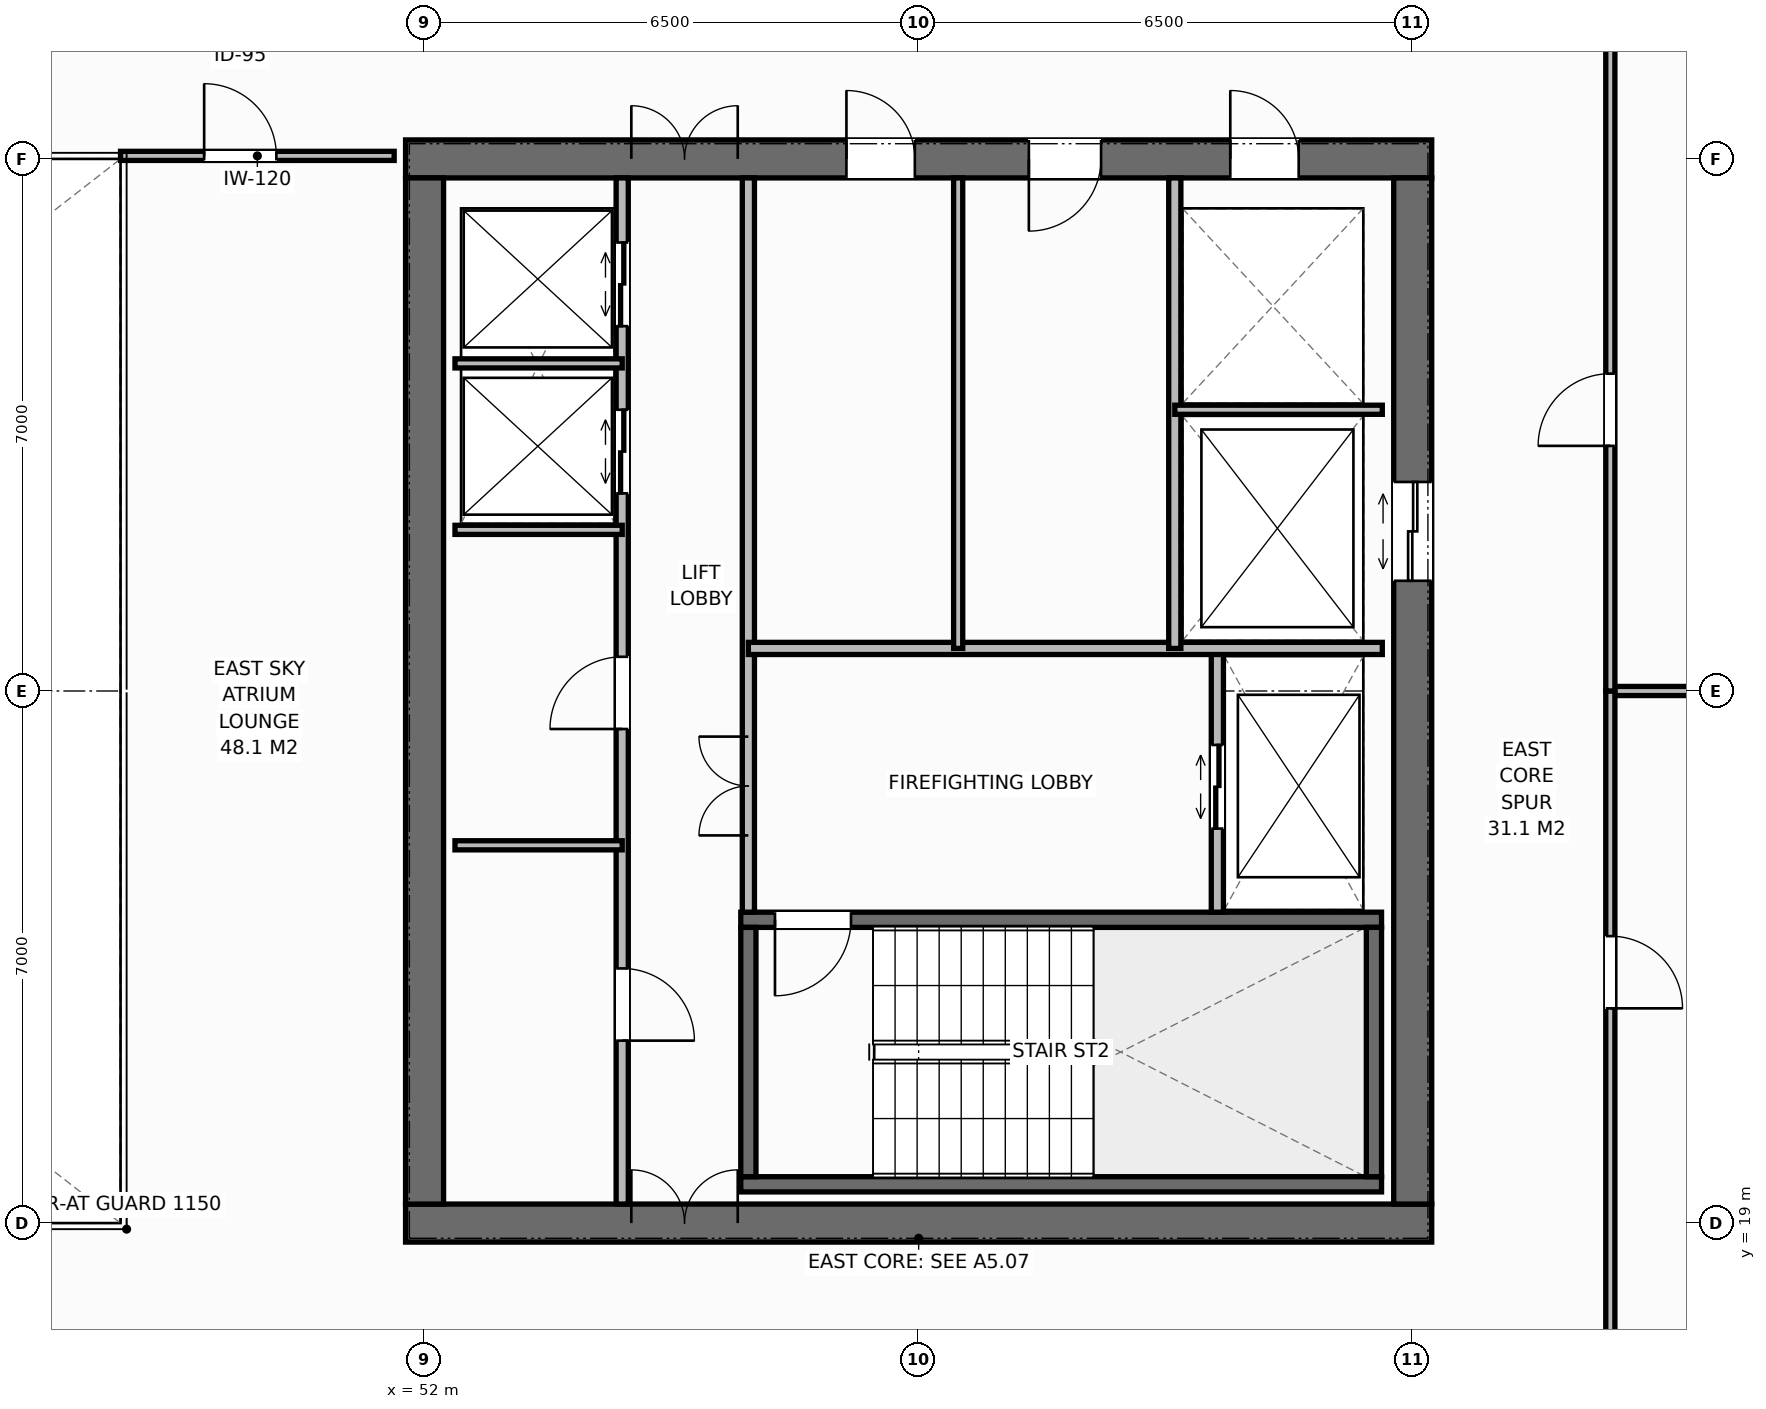
"""IFC4 building model, lengths in metres.
Left out: names, types, materials, properties, quantities, classifications, styles, units other than length and angle.
Written with IfcOpenShell. Run it as: python <this file> out.ifc"""

import sys

from ifc_helpers import new_model, si_unit, direction, frame, frame_2d, origin, place, context, subcontext, project, spatial, rectangle, extrude, element, fill, save


model = new_model("IFC4")
c1 = context("Model", 3, precision=1e-05, world=origin(), true_north=direction((0.0, 1.0)))
c2 = subcontext(c1, "Body", "Model", "MODEL_VIEW")
j1 = project(units=[si_unit("LENGTHUNIT", "METRE"), si_unit("PLANEANGLEUNIT", "RADIAN")], contexts=[c1])
p1 = place(None, origin())
s1 = spatial("IfcSite", under=j1, at=p1, CompositionType="ELEMENT")
p2 = place(p1, origin())
s2 = spatial("IfcBuilding", under=s1, at=p2, CompositionType="ELEMENT")
p3 = place(p2, frame((0.0, 0.0, 206.2)))
s3 = spatial("IfcBuildingStorey", under=s2, at=p3, CompositionType="ELEMENT", Elevation=206.2)
p4 = place(p3, frame((51.75, 19.0, 0.0), z_axis=(0.0, 0.0, 1.0), x_axis=(1.0, 0.0, 0.0)))
e1 = element("IfcWall", 1, at=p4, inside=s3, PredefinedType="SHEAR", context=c2, shape_type="SweptSolid", body=[
    extrude(rectangle(XDim=13.5, YDim=0.5, at=frame_2d((6.75, 0.0))), origin(), (0.0, 0.0, 1.0), 3.8),
])
p5 = place(p4, frame((2.97, 0.0, 0.0)))
e2 = element("IfcOpeningElement", 2, at=p5, cuts=e1, PredefinedType="OPENING", context=c2, shape_type="SweptSolid", body=[
    extrude(rectangle(XDim=1.4, YDim=2.2, at=frame_2d((0.7, 1.1))), frame((0.0, 0.26, 0.0), z_axis=(0.0, -1.0, 0.0), x_axis=(1.0, 0.0, 0.0)), (0.0, 0.0, 1.0), 0.52),
])
p6 = place(p3, frame((51.75, 33.0, 0.0), z_axis=(0.0, 0.0, 1.0), x_axis=(1.0, 0.0, 0.0)))
e3 = element("IfcWall", 3, at=p6, inside=s3, PredefinedType="SHEAR", context=c2, shape_type="SweptSolid", body=[
    extrude(rectangle(XDim=13.5, YDim=0.5, at=frame_2d((6.75, 0.0))), origin(), (0.0, 0.0, 1.0), 3.8),
])
p7 = place(p6, frame((2.97, 0.0, 0.0)))
e4 = element("IfcOpeningElement", 4, at=p7, cuts=e3, PredefinedType="OPENING", context=c2, shape_type="SweptSolid", body=[
    extrude(rectangle(XDim=1.4, YDim=2.2, at=frame_2d((0.7, 1.1))), frame((0.0, 0.26, 0.0), z_axis=(0.0, -1.0, 0.0), x_axis=(1.0, 0.0, 0.0)), (0.0, 0.0, 1.0), 0.52),
])
p8 = place(p6, frame((10.85, 0.0, 0.0)))
e5 = element("IfcOpeningElement", 5, at=p8, cuts=e3, PredefinedType="OPENING", context=c2, shape_type="SweptSolid", body=[
    extrude(rectangle(XDim=0.9, YDim=2.15, at=frame_2d((0.45, 1.075))), frame((0.0, 0.26, 0.0), z_axis=(0.0, -1.0, 0.0), x_axis=(1.0, 0.0, 0.0)), (0.0, 0.0, 1.0), 0.52),
])
p9 = place(p6, frame((5.8, 0.0, 0.0)))
e6 = element("IfcOpeningElement", 6, at=p9, cuts=e3, PredefinedType="OPENING", context=c2, shape_type="SweptSolid", body=[
    extrude(rectangle(XDim=0.9, YDim=2.15, at=frame_2d((0.45, 1.075))), frame((0.0, 0.26, 0.0), z_axis=(0.0, -1.0, 0.0), x_axis=(1.0, 0.0, 0.0)), (0.0, 0.0, 1.0), 0.52),
])
p10 = place(p6, frame((8.2, 0.0, 0.0)))
e7 = element("IfcOpeningElement", 7, at=p10, cuts=e3, PredefinedType="OPENING", context=c2, shape_type="SweptSolid", body=[
    extrude(rectangle(XDim=0.95, YDim=2.15, at=frame_2d((0.475, 1.075))), frame((0.0, 0.26, 0.0), z_axis=(0.0, -1.0, 0.0), x_axis=(1.0, 0.0, 0.0)), (0.0, 0.0, 1.0), 0.52),
])
p11 = place(p3, frame((52.0, 19.25, 0.0), z_axis=(0.0, 0.0, 1.0), x_axis=(0.0, 1.0, 0.0)))
e8 = element("IfcWall", 8, at=p11, inside=s3, PredefinedType="SHEAR", context=c2, shape_type="SweptSolid", body=[
    extrude(rectangle(XDim=13.5, YDim=0.5, at=frame_2d((6.75, 0.0))), origin(), (0.0, 0.0, 1.0), 3.8),
])
p12 = place(p3, frame((65.0, 19.25, 0.0), z_axis=(0.0, 0.0, 1.0), x_axis=(0.0, 1.0, 0.0)))
e9 = element("IfcWall", 9, at=p12, inside=s3, PredefinedType="SHEAR", context=c2, shape_type="SweptSolid", body=[
    extrude(rectangle(XDim=13.5, YDim=0.5, at=frame_2d((6.75, 0.0))), origin(), (0.0, 0.0, 1.0), 3.8),
])
p13 = place(p12, frame((8.2, 0.0, 0.0)))
e10 = element("IfcOpeningElement", 10, at=p13, cuts=e9, PredefinedType="OPENING", context=c2, shape_type="SweptSolid", body=[
    extrude(rectangle(XDim=1.3, YDim=2.2, at=frame_2d((0.65, 1.1))), frame((0.0, 0.26, 0.0), z_axis=(0.0, -1.0, 0.0), x_axis=(1.0, 0.0, 0.0)), (0.0, 0.0, 1.0), 0.52),
])
p14 = place(p3, frame((56.16, 19.51, 0.0), z_axis=(0.0, 0.0, 1.0), x_axis=(1.0, 0.0, 0.0)))
e11 = element("IfcWall", 11, at=p14, inside=s3, PredefinedType="SHEAR", context=c2, shape_type="SweptSolid", body=[
    extrude(rectangle(XDim=8.43, YDim=0.2, at=frame_2d((4.215, 0.0))), origin(), (0.0, 0.0, 1.0), 3.8),
])
p15 = place(p3, frame((56.16, 22.99, 0.0), z_axis=(0.0, 0.0, 1.0), x_axis=(1.0, 0.0, 0.0)))
e12 = element("IfcWall", 12, at=p15, inside=s3, PredefinedType="SHEAR", context=c2, shape_type="SweptSolid", body=[
    extrude(rectangle(XDim=8.43, YDim=0.2, at=frame_2d((4.215, 0.0))), origin(), (0.0, 0.0, 1.0), 3.8),
])
p16 = place(p15, frame((0.45, 0.0, 0.0)))
e13 = element("IfcOpeningElement", 13, at=p16, cuts=e12, PredefinedType="OPENING", context=c2, shape_type="SweptSolid", body=[
    extrude(rectangle(XDim=1.0, YDim=2.15, at=frame_2d((0.5, 1.075))), frame((0.0, 0.11, 0.0), z_axis=(0.0, -1.0, 0.0), x_axis=(1.0, 0.0, 0.0)), (0.0, 0.0, 1.0), 0.22),
])
for number, where, z_axis, x_axis in (
    (14, (56.26, 19.61, 0.0), (0.0, 0.0, 1.0), (0.0, 1.0, 0.0)),
    (15, (64.49, 19.61, 0.0), (0.0, 0.0, 1.0), (0.0, 1.0, 0.0)),
):
    element("IfcWall", number, at=place(p3, frame(where, z_axis=z_axis, x_axis=x_axis)), inside=s3, PredefinedType="SHEAR", context=c2, shape_type="SweptSolid", body=[
        extrude(rectangle(XDim=3.28, YDim=0.2, at=frame_2d((1.64, 0.0))), origin(), (0.0, 0.0, 1.0), 3.8),
    ])
p17 = place(p3, frame((54.6, 19.25, 0.0), z_axis=(0.0, 0.0, 1.0), x_axis=(0.0, 1.0, 0.0)))
e16 = element("IfcWall", 16, at=p17, inside=s3, PredefinedType="STANDARD", context=c2, shape_type="SweptSolid", body=[
    extrude(rectangle(XDim=13.5, YDim=0.16, at=frame_2d((6.75, 0.0))), origin(), (0.0, 0.0, 1.0), 3.58),
])
p18 = place(p17, frame((2.15, 0.0, 0.0)))
e17 = element("IfcOpeningElement", 17, at=p18, cuts=e16, PredefinedType="OPENING", context=c2, shape_type="SweptSolid", body=[
    extrude(rectangle(XDim=0.95, YDim=2.15, at=frame_2d((0.475, 1.075))), frame((0.0, 0.09, 0.0), z_axis=(0.0, -1.0, 0.0), x_axis=(1.0, 0.0, 0.0)), (0.0, 0.0, 1.0), 0.18),
])
p19 = place(p17, frame((6.25, 0.0, 0.0)))
e18 = element("IfcOpeningElement", 18, at=p19, cuts=e16, PredefinedType="OPENING", context=c2, shape_type="SweptSolid", body=[
    extrude(rectangle(XDim=0.95, YDim=2.15, at=frame_2d((0.475, 1.075))), frame((0.0, 0.09, 0.0), z_axis=(0.0, -1.0, 0.0), x_axis=(1.0, 0.0, 0.0)), (0.0, 0.0, 1.0), 0.18),
])
p20 = place(p17, frame((9.35, 0.0, 0.0)))
e19 = element("IfcOpeningElement", 19, at=p20, cuts=e16, PredefinedType="OPENING", context=c2, shape_type="SweptSolid", body=[
    extrude(rectangle(XDim=1.1, YDim=2.2, at=frame_2d((0.55, 1.1))), frame((0.0, 0.09, 0.0), z_axis=(0.0, -1.0, 0.0), x_axis=(1.0, 0.0, 0.0)), (0.0, 0.0, 1.0), 0.18),
])
p21 = place(p17, frame((11.55, 0.0, 0.0)))
e20 = element("IfcOpeningElement", 20, at=p21, cuts=e16, PredefinedType="OPENING", context=c2, shape_type="SweptSolid", body=[
    extrude(rectangle(XDim=1.1, YDim=2.2, at=frame_2d((0.55, 1.1))), frame((0.0, 0.09, 0.0), z_axis=(0.0, -1.0, 0.0), x_axis=(1.0, 0.0, 0.0)), (0.0, 0.0, 1.0), 0.18),
])
p22 = place(p3, frame((56.26, 23.09, 0.0), z_axis=(0.0, 0.0, 1.0), x_axis=(0.0, 1.0, 0.0)))
e21 = element("IfcWall", 21, at=p22, inside=s3, PredefinedType="STANDARD", context=c2, shape_type="SweptSolid", body=[
    extrude(rectangle(XDim=9.66, YDim=0.16, at=frame_2d((4.83, 0.0))), origin(), (0.0, 0.0, 1.0), 3.58),
])
p23 = place(p22, frame((1.01, 0.0, 0.0)))
e22 = element("IfcOpeningElement", 22, at=p23, cuts=e21, PredefinedType="OPENING", context=c2, shape_type="SweptSolid", body=[
    extrude(rectangle(XDim=1.3, YDim=2.2, at=frame_2d((0.65, 1.1))), frame((0.0, 0.09, 0.0), z_axis=(0.0, -1.0, 0.0), x_axis=(1.0, 0.0, 0.0)), (0.0, 0.0, 1.0), 0.18),
])
for number, where, z_axis, x_axis in (
    (23, (52.4, 23.97, 0.0), (0.0, 0.0, 1.0), (1.0, 0.0, 0.0)),
    (24, (52.4, 28.12, 0.0), (0.0, 0.0, 1.0), (1.0, 0.0, 0.0)),
    (25, (52.4, 30.31, 0.0), (0.0, 0.0, 1.0), (1.0, 0.0, 0.0)),
):
    element("IfcWall", number, at=place(p3, frame(where, z_axis=z_axis, x_axis=x_axis)), inside=s3, PredefinedType="PARTITIONING", context=c2, shape_type="SweptSolid", body=[
        extrude(rectangle(XDim=2.2, YDim=0.12, at=frame_2d((1.1, 0.0))), origin(), (0.0, 0.0, 1.0), 3.58),
    ])
p24 = place(p3, frame((62.43, 23.09, 0.0), z_axis=(0.0, 0.0, 1.0), x_axis=(0.0, 1.0, 0.0)))
e26 = element("IfcWall", 26, at=p24, inside=s3, PredefinedType="STANDARD", context=c2, shape_type="SweptSolid", body=[
    extrude(rectangle(XDim=3.47, YDim=0.16, at=frame_2d((1.735, 0.0))), origin(), (0.0, 0.0, 1.0), 3.58),
])
p25 = place(p24, frame((1.1, 0.0, 0.0)))
e27 = element("IfcOpeningElement", 27, at=p25, cuts=e26, PredefinedType="OPENING", context=c2, shape_type="SweptSolid", body=[
    extrude(rectangle(XDim=1.1, YDim=2.2, at=frame_2d((0.55, 1.1))), frame((0.0, 0.09, 0.0), z_axis=(0.0, -1.0, 0.0), x_axis=(1.0, 0.0, 0.0)), (0.0, 0.0, 1.0), 0.18),
])
p26 = place(p3, frame((56.26, 26.56, 0.0), z_axis=(0.0, 0.0, 1.0), x_axis=(1.0, 0.0, 0.0)))
e28 = element("IfcWall", 28, at=p26, inside=s3, PredefinedType="STANDARD", context=c2, shape_type="SweptSolid", body=[
    extrude(rectangle(XDim=8.34, YDim=0.16, at=frame_2d((4.17, 0.0))), origin(), (0.0, 0.0, 1.0), 3.58),
])
p27 = place(p3, frame((61.87, 26.56, 0.0), z_axis=(0.0, 0.0, 1.0), x_axis=(0.0, 1.0, 0.0)))
e29 = element("IfcWall", 29, at=p27, inside=s3, PredefinedType="STANDARD", context=c2, shape_type="SweptSolid", body=[
    extrude(rectangle(XDim=6.19, YDim=0.16, at=frame_2d((3.095, 0.0))), origin(), (0.0, 0.0, 1.0), 3.58),
])
p28 = place(p3, frame((61.87, 29.7, 0.0), z_axis=(0.0, 0.0, 1.0), x_axis=(1.0, 0.0, 0.0)))
e30 = element("IfcWall", 30, at=p28, inside=s3, PredefinedType="PARTITIONING", context=c2, shape_type="SweptSolid", body=[
    extrude(rectangle(XDim=2.73, YDim=0.12, at=frame_2d((1.365, 0.0))), origin(), (0.0, 0.0, 1.0), 3.58),
])
p29 = place(p3, frame((59.02, 26.56, 0.0), z_axis=(0.0, 0.0, 1.0), x_axis=(0.0, 1.0, 0.0)))
e31 = element("IfcWall", 31, at=p29, inside=s3, PredefinedType="PARTITIONING", context=c2, shape_type="SweptSolid", body=[
    extrude(rectangle(XDim=6.19, YDim=0.12, at=frame_2d((3.095, 0.0))), origin(), (0.0, 0.0, 1.0), 3.58),
])
p30 = place(p3, frame((48.0, 33.04, 0.0), z_axis=(0.0, 0.0, 1.0), x_axis=(1.0, 0.0, 0.0)))
e32 = element("IfcWall", 32, at=p30, inside=s3, PredefinedType="PARTITIONING", context=c2, shape_type="SweptSolid", body=[
    extrude(rectangle(XDim=3.6, YDim=0.12, at=frame_2d((1.8, 0.0))), origin(), (0.0, 0.0, 1.0), 3.32),
])
p31 = place(p30, frame((1.1, 0.0, 0.0)))
e33 = element("IfcOpeningElement", 33, at=p31, cuts=e32, PredefinedType="OPENING", context=c2, shape_type="SweptSolid", body=[
    extrude(rectangle(XDim=0.95, YDim=2.15, at=frame_2d((0.475, 1.075))), frame((0.0, 0.07, 0.0), z_axis=(0.0, -1.0, 0.0), x_axis=(1.0, 0.0, 0.0)), (0.0, 0.0, 1.0), 0.14),
])
p32 = place(p3, frame((67.6, 26.0, 0.0), z_axis=(0.0, 0.0, 1.0), x_axis=(1.0, 0.0, 0.0)))
e34 = element("IfcWall", 34, at=p32, inside=s3, PredefinedType="PARTITIONING", context=c2, shape_type="SweptSolid", body=[
    extrude(rectangle(XDim=4.58, YDim=0.12, at=frame_2d((2.29, 0.0))), origin(), (0.0, 0.0, 1.0), 3.58),
])
p33 = place(p3, frame((67.6, 16.5, 0.0), z_axis=(0.0, 0.0, 1.0), x_axis=(0.0, 1.0, 0.0)))
e35 = element("IfcWall", 35, at=p33, inside=s3, PredefinedType="PARTITIONING", context=c2, shape_type="SweptSolid", body=[
    extrude(rectangle(XDim=9.5, YDim=0.12, at=frame_2d((4.75, 0.0))), origin(), (0.0, 0.0, 1.0), 3.58),
])
p34 = place(p33, frame((5.325, 0.0, 0.0)))
e36 = element("IfcOpeningElement", 36, at=p34, cuts=e35, PredefinedType="OPENING", context=c2, shape_type="SweptSolid", body=[
    extrude(rectangle(XDim=0.95, YDim=2.15, at=frame_2d((0.475, 1.075))), frame((0.0, 0.07, 0.0), z_axis=(0.0, -1.0, 0.0), x_axis=(1.0, 0.0, 0.0)), (0.0, 0.0, 1.0), 0.14),
])
p35 = place(p3, frame((67.6, 26.0, 0.0), z_axis=(0.0, 0.0, 1.0), x_axis=(0.0, 1.0, 0.0)))
e37 = element("IfcWall", 37, at=p35, inside=s3, PredefinedType="PARTITIONING", context=c2, shape_type="SweptSolid", body=[
    extrude(rectangle(XDim=9.5, YDim=0.12, at=frame_2d((4.75, 0.0))), origin(), (0.0, 0.0, 1.0), 3.58),
])
p36 = place(p35, frame((3.225, 0.0, 0.0)))
e38 = element("IfcOpeningElement", 38, at=p36, cuts=e37, PredefinedType="OPENING", context=c2, shape_type="SweptSolid", body=[
    extrude(rectangle(XDim=0.95, YDim=2.15, at=frame_2d((0.475, 1.075))), frame((0.0, 0.07, 0.0), z_axis=(0.0, -1.0, 0.0), x_axis=(1.0, 0.0, 0.0)), (0.0, 0.0, 1.0), 0.14),
])
p37 = place(p5, origin())
e39 = element("IfcDoor", 39, at=p37, inside=s3, OperationType="DOUBLE_DOOR_SINGLE_SWING", PredefinedType="DOOR", context=c2, shape_type="SweptSolid", body=[
    extrude(rectangle(XDim=1.4, YDim=2.2, at=frame_2d((0.7, 1.1))), frame((0.0, 0.075, 0.0), z_axis=(0.0, -1.0, 0.0), x_axis=(1.0, 0.0, 0.0)), (0.0, 0.0, 1.0), 0.05),
])
fill(e2, e39)
p38 = place(p7, origin())
e40 = element("IfcDoor", 40, at=p38, inside=s3, OperationType="DOUBLE_DOOR_SINGLE_SWING", PredefinedType="DOOR", context=c2, shape_type="SweptSolid", body=[
    extrude(rectangle(XDim=1.4, YDim=2.2, at=frame_2d((0.7, 1.1))), frame((0.0, -0.025, 0.0), z_axis=(0.0, -1.0, 0.0), x_axis=(1.0, 0.0, 0.0)), (0.0, 0.0, 1.0), 0.05),
])
fill(e4, e40)
p39 = place(p18, origin())
e41 = element("IfcDoor", 41, at=p39, inside=s3, OperationType="SINGLE_SWING_RIGHT", PredefinedType="DOOR", context=c2, shape_type="SweptSolid", body=[
    extrude(rectangle(XDim=0.95, YDim=2.15, at=frame_2d((0.475, 1.075))), frame((0.0, 0.025, 0.0), z_axis=(0.0, -1.0, 0.0), x_axis=(1.0, 0.0, 0.0)), (0.0, 0.0, 1.0), 0.05),
])
fill(e17, e41)
p40 = place(p19, origin())
e42 = element("IfcDoor", 42, at=p40, inside=s3, OperationType="SINGLE_SWING_LEFT", PredefinedType="DOOR", context=c2, shape_type="SweptSolid", body=[
    extrude(rectangle(XDim=0.95, YDim=2.15, at=frame_2d((0.475, 1.075))), frame((0.0, 0.025, 0.0), z_axis=(0.0, -1.0, 0.0), x_axis=(1.0, 0.0, 0.0)), (0.0, 0.0, 1.0), 0.05),
])
fill(e18, e42)
p41 = place(p20, origin())
e43 = element("IfcDoor", 43, at=p41, inside=s3, OperationType="DOUBLE_DOOR_SLIDING", PredefinedType="DOOR", context=c2, shape_type="SweptSolid", body=[
    extrude(rectangle(XDim=1.1, YDim=2.2, at=frame_2d((0.55, 1.1))), frame((0.0, 0.025, 0.0), z_axis=(0.0, -1.0, 0.0), x_axis=(1.0, 0.0, 0.0)), (0.0, 0.0, 1.0), 0.05),
])
fill(e19, e43)
p42 = place(p21, origin())
e44 = element("IfcDoor", 44, at=p42, inside=s3, OperationType="DOUBLE_DOOR_SLIDING", PredefinedType="DOOR", context=c2, shape_type="SweptSolid", body=[
    extrude(rectangle(XDim=1.1, YDim=2.2, at=frame_2d((0.55, 1.1))), frame((0.0, 0.025, 0.0), z_axis=(0.0, -1.0, 0.0), x_axis=(1.0, 0.0, 0.0)), (0.0, 0.0, 1.0), 0.05),
])
fill(e20, e44)
p43 = place(p16, origin())
e45 = element("IfcDoor", 45, at=p43, inside=s3, OperationType="SINGLE_SWING_RIGHT", PredefinedType="DOOR", context=c2, shape_type="SweptSolid", body=[
    extrude(rectangle(XDim=1.0, YDim=2.15, at=frame_2d((0.5, 1.075))), frame((0.0, 0.025, 0.0), z_axis=(0.0, -1.0, 0.0), x_axis=(1.0, 0.0, 0.0)), (0.0, 0.0, 1.0), 0.05),
])
fill(e13, e45)
p44 = place(p25, origin())
e46 = element("IfcDoor", 46, at=p44, inside=s3, OperationType="DOUBLE_DOOR_SLIDING", PredefinedType="DOOR", context=c2, shape_type="SweptSolid", body=[
    extrude(rectangle(XDim=1.1, YDim=2.2, at=frame_2d((0.55, 1.1))), frame((0.0, 0.025, 0.0), z_axis=(0.0, -1.0, 0.0), x_axis=(1.0, 0.0, 0.0)), (0.0, 0.0, 1.0), 0.05),
])
fill(e27, e46)
p45 = place(p23, origin())
e47 = element("IfcDoor", 47, at=p45, inside=s3, OperationType="DOUBLE_DOOR_SINGLE_SWING", PredefinedType="DOOR", context=c2, shape_type="SweptSolid", body=[
    extrude(rectangle(XDim=1.3, YDim=2.2, at=frame_2d((0.65, 1.1))), frame((0.0, 0.025, 0.0), z_axis=(0.0, -1.0, 0.0), x_axis=(1.0, 0.0, 0.0)), (0.0, 0.0, 1.0), 0.05),
])
fill(e22, e47)
p46 = place(p13, origin())
e48 = element("IfcDoor", 48, at=p46, inside=s3, OperationType="DOUBLE_DOOR_SLIDING", PredefinedType="DOOR", context=c2, shape_type="SweptSolid", body=[
    extrude(rectangle(XDim=1.3, YDim=2.2, at=frame_2d((0.65, 1.1))), frame((0.0, 0.025, 0.0), z_axis=(0.0, -1.0, 0.0), x_axis=(1.0, 0.0, 0.0)), (0.0, 0.0, 1.0), 0.05),
])
fill(e10, e48)
p47 = place(p8, origin())
e49 = element("IfcDoor", 49, at=p47, inside=s3, OperationType="SINGLE_SWING_LEFT", PredefinedType="DOOR", context=c2, shape_type="SweptSolid", body=[
    extrude(rectangle(XDim=0.9, YDim=2.15, at=frame_2d((0.45, 1.075))), frame((0.0, -0.025, 0.0), z_axis=(0.0, -1.0, 0.0), x_axis=(1.0, 0.0, 0.0)), (0.0, 0.0, 1.0), 0.05),
])
fill(e5, e49)
p48 = place(p9, origin())
e50 = element("IfcDoor", 50, at=p48, inside=s3, OperationType="SINGLE_SWING_LEFT", PredefinedType="DOOR", context=c2, shape_type="SweptSolid", body=[
    extrude(rectangle(XDim=0.9, YDim=2.15, at=frame_2d((0.45, 1.075))), frame((0.0, -0.025, 0.0), z_axis=(0.0, -1.0, 0.0), x_axis=(1.0, 0.0, 0.0)), (0.0, 0.0, 1.0), 0.05),
])
fill(e6, e50)
p49 = place(p10, origin())
e51 = element("IfcDoor", 51, at=p49, inside=s3, OperationType="SINGLE_SWING_RIGHT", PredefinedType="DOOR", context=c2, shape_type="SweptSolid", body=[
    extrude(rectangle(XDim=0.95, YDim=2.15, at=frame_2d((0.475, 1.075))), frame((0.0, -0.025, 0.0), z_axis=(0.0, -1.0, 0.0), x_axis=(1.0, 0.0, 0.0)), (0.0, 0.0, 1.0), 0.05),
])
fill(e7, e51)
p50 = place(p31, origin())
e52 = element("IfcDoor", 52, at=p50, inside=s3, OperationType="SINGLE_SWING_LEFT", PredefinedType="DOOR", context=c2, shape_type="SweptSolid", body=[
    extrude(rectangle(XDim=0.95, YDim=2.15, at=frame_2d((0.475, 1.075))), frame((0.0, 0.025, 0.0), z_axis=(0.0, -1.0, 0.0), x_axis=(1.0, 0.0, 0.0)), (0.0, 0.0, 1.0), 0.05),
])
fill(e33, e52)
p51 = place(p34, origin())
e53 = element("IfcDoor", 53, at=p51, inside=s3, OperationType="SINGLE_SWING_RIGHT", PredefinedType="DOOR", context=c2, shape_type="SweptSolid", body=[
    extrude(rectangle(XDim=0.95, YDim=2.15, at=frame_2d((0.475, 1.075))), frame((0.0, 0.025, 0.0), z_axis=(0.0, -1.0, 0.0), x_axis=(1.0, 0.0, 0.0)), (0.0, 0.0, 1.0), 0.05),
])
fill(e36, e53)
p52 = place(p36, origin())
e54 = element("IfcDoor", 54, at=p52, inside=s3, OperationType="SINGLE_SWING_LEFT", PredefinedType="DOOR", context=c2, shape_type="SweptSolid", body=[
    extrude(rectangle(XDim=0.95, YDim=2.15, at=frame_2d((0.475, 1.075))), frame((0.0, 0.025, 0.0), z_axis=(0.0, -1.0, 0.0), x_axis=(1.0, 0.0, 0.0)), (0.0, 0.0, 1.0), 0.05),
])
fill(e38, e54)
save(model, sys.argv[1])
